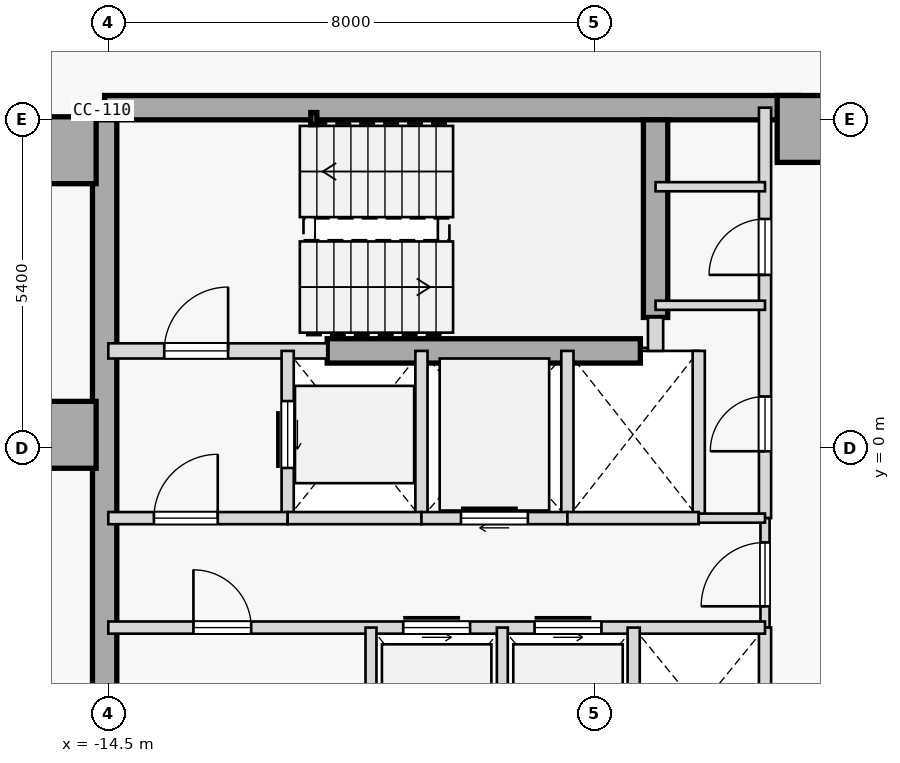
"""IFC4 building model, lengths in metres.
Left out: names, types, materials, properties, quantities, classifications, styles, units other than length and angle.
Written with IfcOpenShell. Run it as: python <this file> out.ifc"""

import sys

from ifc_helpers import new_model, si_unit, direction, frame, frame_2d, origin, origin_2d, place, context, subcontext, project, spatial, rectangle, hollow_rectangle, extrude, element, fill, save


model = new_model("IFC4")
c1 = context("Model", 3, precision=1e-05, world=origin(), true_north=direction((0.0, 1.0)))
c2 = subcontext(c1, "Body", "Model", "MODEL_VIEW")
j1 = project(units=[si_unit("LENGTHUNIT", "METRE"), si_unit("PLANEANGLEUNIT", "RADIAN")], contexts=[c1])
p1 = place(None, origin())
s1 = spatial("IfcSite", under=j1, at=p1, CompositionType="ELEMENT")
p2 = place(p1, origin())
s2 = spatial("IfcBuilding", under=s1, at=p2, CompositionType="ELEMENT")
p3 = place(p2, frame((0.0, 0.0, 175.2)))
s3 = spatial("IfcBuildingStorey", under=s2, at=p3, CompositionType="ELEMENT", Elevation=175.2)
for number, where, z_axis, x_axis in (
    (1, (-15.25, 4.9, 0.0), (0.0, 0.0, 1.0), (1.0, 0.0, 0.0)),
    (2, (-15.25, 0.22, 0.0), (0.0, 0.0, 1.0), (1.0, 0.0, 0.0)),
    (3, (-2.95, 5.25, 0.0), (0.0, 0.0, 1.0), (1.0, 0.0, 0.0)),
):
    element("IfcColumn", number, at=place(p3, frame(where, z_axis=z_axis, x_axis=x_axis)), inside=s3, PredefinedType="COLUMN", context=c2, shape_type="SweptSolid", body=[
        extrude(rectangle(XDim=1.1, YDim=1.1, at=origin_2d()), origin(), (0.0, 0.0, 1.0), 3.4),
    ])
p4 = place(p3, frame((-14.56, 5.6, 0.0), z_axis=(0.0, 0.0, 1.0), x_axis=(1.0, 0.0, 0.0)))
e4 = element("IfcWall", 4, at=p4, inside=s3, PredefinedType="SHEAR", context=c2, shape_type="SweptSolid", body=[
    extrude(rectangle(XDim=11.41, YDim=0.4, at=frame_2d((5.705, 0.0))), origin(), (0.0, 0.0, 1.0), 3.175),
])
p5 = place(p3, frame((-14.56, -5.4, 0.0), z_axis=(0.0, 0.0, 1.0), x_axis=(0.0, 1.0, 0.0)))
e5 = element("IfcWall", 5, at=p5, inside=s3, PredefinedType="SHEAR", context=c2, shape_type="SweptSolid", body=[
    extrude(rectangle(XDim=10.8, YDim=0.4, at=frame_2d((5.4, 0.0))), origin(), (0.0, 0.0, 1.0), 3.175),
])
p6 = place(p3, frame((-5.5, 2.15, 0.0), z_axis=(0.0, 0.0, 1.0), x_axis=(0.0, 1.0, 0.0)))
e6 = element("IfcWall", 6, at=p6, inside=s3, PredefinedType="SHEAR", context=c2, shape_type="SweptSolid", body=[
    extrude(rectangle(XDim=3.25, YDim=0.4, at=frame_2d((1.625, 0.0))), origin(), (0.0, 0.0, 1.0), 3.175),
])
p7 = place(p3, frame((-10.9, 1.6, 0.0), z_axis=(0.0, 0.0, 1.0), x_axis=(1.0, 0.0, 0.0)))
e7 = element("IfcWall", 7, at=p7, inside=s3, PredefinedType="SHEAR", context=c2, shape_type="SweptSolid", body=[
    extrude(rectangle(XDim=5.15, YDim=0.4, at=frame_2d((2.575, 0.0))), origin(), (0.0, 0.0, 1.0), 3.175),
])
p8 = place(p3, frame((-11.12, 5.42, 0.0), z_axis=(0.0, 0.0, 1.0), x_axis=(1.0, 0.0, 0.0)))
e8 = element("IfcColumn", 8, at=p8, inside=s3, PredefinedType="COLUMN", context=c2, shape_type="SweptSolid", body=[
    extrude(hollow_rectangle(XDim=0.1, YDim=0.2, WallThickness=0.008, at=origin_2d()), origin(), (0.0, 0.0, 1.0), 3.4),
])
p9 = place(p3, frame((-14.5, 1.6, 0.0), z_axis=(0.0, 0.0, 1.0), x_axis=(1.0, 0.0, 0.0)))
e9 = element("IfcWall", 9, at=p9, inside=s3, PredefinedType="STANDARD", context=c2, shape_type="SweptSolid", body=[
    extrude(rectangle(XDim=3.6, YDim=0.25, at=frame_2d((1.8, 0.0))), origin(), (0.0, 0.0, 1.0), 3.175),
])
p10 = place(p9, frame((0.92, 0.0, 0.0)))
e10 = element("IfcOpeningElement", 10, at=p10, cuts=e9, PredefinedType="OPENING", context=c2, shape_type="SweptSolid", body=[
    extrude(rectangle(XDim=1.05, YDim=2.15, at=frame_2d((0.525, 1.075))), frame((0.0, 0.135, 0.0), z_axis=(0.0, -1.0, 0.0), x_axis=(1.0, 0.0, 0.0)), (0.0, 0.0, 1.0), 0.27),
])
p11 = place(p3, frame((-5.5, 1.6, 0.0), z_axis=(0.0, 0.0, 1.0), x_axis=(0.0, 1.0, 0.0)))
e11 = element("IfcWall", 11, at=p11, inside=s3, PredefinedType="STANDARD", context=c2, shape_type="SweptSolid", body=[
    extrude(rectangle(XDim=0.55, YDim=0.25, at=frame_2d((0.275, 0.0))), origin(), (0.0, 0.0, 1.0), 3.175),
])
p12 = place(p3, frame((-3.7, -1.15, 0.0), z_axis=(0.0, 0.0, 1.0), x_axis=(0.0, 1.0, 0.0)))
e12 = element("IfcWall", 12, at=p12, inside=s3, PredefinedType="STANDARD", context=c2, shape_type="SweptSolid", body=[
    extrude(rectangle(XDim=6.75, YDim=0.2, at=frame_2d((3.375, 0.0))), origin(), (0.0, 0.0, 1.0), 3.175),
])
p13 = place(p12, frame((1.1, 0.0, 0.0)))
e13 = element("IfcOpeningElement", 13, at=p13, cuts=e12, PredefinedType="OPENING", context=c2, shape_type="SweptSolid", body=[
    extrude(rectangle(XDim=0.9, YDim=2.15, at=frame_2d((0.45, 1.075))), frame((0.0, 0.11, 0.0), z_axis=(0.0, -1.0, 0.0), x_axis=(1.0, 0.0, 0.0)), (0.0, 0.0, 1.0), 0.22),
])
p14 = place(p12, frame((4.0, 0.0, 0.0)))
e14 = element("IfcOpeningElement", 14, at=p14, cuts=e12, PredefinedType="OPENING", context=c2, shape_type="SweptSolid", body=[
    extrude(rectangle(XDim=0.92, YDim=2.15, at=frame_2d((0.46, 1.075))), frame((0.0, 0.11, 0.0), z_axis=(0.0, -1.0, 0.0), x_axis=(1.0, 0.0, 0.0)), (0.0, 0.0, 1.0), 0.22),
])
p15 = place(p3, frame((-3.7, -2.95, 0.0), z_axis=(0.0, 0.0, 1.0), x_axis=(0.0, 1.0, 0.0)))
e15 = element("IfcWall", 15, at=p15, inside=s3, PredefinedType="PARTITIONING", context=c2, shape_type="SweptSolid", body=[
    extrude(rectangle(XDim=1.8, YDim=0.15, at=frame_2d((0.9, 0.0))), origin(), (0.0, 0.0, 1.0), 3.175),
])
p16 = place(p15, frame((0.35, 0.0, 0.0)))
e16 = element("IfcOpeningElement", 16, at=p16, cuts=e15, PredefinedType="OPENING", context=c2, shape_type="SweptSolid", body=[
    extrude(rectangle(XDim=1.05, YDim=2.18, at=frame_2d((0.525, 1.09))), frame((0.0, 0.085, 0.0), z_axis=(0.0, -1.0, 0.0), x_axis=(1.0, 0.0, 0.0)), (0.0, 0.0, 1.0), 0.17),
])
p17 = place(p3, frame((-3.7, -5.6, 0.0), z_axis=(0.0, 0.0, 1.0), x_axis=(0.0, 1.0, 0.0)))
e17 = element("IfcWall", 17, at=p17, inside=s3, PredefinedType="STANDARD", context=c2, shape_type="SweptSolid", body=[
    extrude(rectangle(XDim=2.65, YDim=0.2, at=frame_2d((1.325, 0.0))), origin(), (0.0, 0.0, 1.0), 3.175),
])
p18 = place(p3, frame((-11.55, -1.15, 0.0), z_axis=(0.0, 0.0, 1.0), x_axis=(0.0, 1.0, 0.0)))
e18 = element("IfcWall", 18, at=p18, inside=s3, PredefinedType="STANDARD", context=c2, shape_type="SweptSolid", body=[
    extrude(rectangle(XDim=2.75, YDim=0.2, at=frame_2d((1.375, 0.0))), origin(), (0.0, 0.0, 1.0), 3.175),
])
p19 = place(p18, frame((0.825, 0.0, 0.0)))
e19 = element("IfcOpeningElement", 19, at=p19, cuts=e18, PredefinedType="OPENING", context=c2, shape_type="SweptSolid", body=[
    extrude(rectangle(XDim=1.1, YDim=2.15, at=frame_2d((0.55, 1.075))), frame((0.0, 0.11, 0.0), z_axis=(0.0, -1.0, 0.0), x_axis=(1.0, 0.0, 0.0)), (0.0, 0.0, 1.0), 0.22),
])
p20 = place(p3, frame((-9.35, -1.15, 0.0), z_axis=(0.0, 0.0, 1.0), x_axis=(0.0, 1.0, 0.0)))
e20 = element("IfcWall", 20, at=p20, inside=s3, PredefinedType="STANDARD", context=c2, shape_type="SweptSolid", body=[
    extrude(rectangle(XDim=2.75, YDim=0.2, at=frame_2d((1.375, 0.0))), origin(), (0.0, 0.0, 1.0), 3.175),
])
p21 = place(p3, frame((-14.5, -1.15, 0.0), z_axis=(0.0, 0.0, 1.0), x_axis=(1.0, 0.0, 0.0)))
e21 = element("IfcWall", 21, at=p21, inside=s3, PredefinedType="STANDARD", context=c2, shape_type="SweptSolid", body=[
    extrude(rectangle(XDim=2.95, YDim=0.2, at=frame_2d((1.475, 0.0))), origin(), (0.0, 0.0, 1.0), 3.175),
])
p22 = place(p21, frame((0.75, 0.0, 0.0)))
e22 = element("IfcOpeningElement", 22, at=p22, cuts=e21, PredefinedType="OPENING", context=c2, shape_type="SweptSolid", body=[
    extrude(rectangle(XDim=1.05, YDim=2.18, at=frame_2d((0.525, 1.09))), frame((0.0, 0.11, 0.0), z_axis=(0.0, -1.0, 0.0), x_axis=(1.0, 0.0, 0.0)), (0.0, 0.0, 1.0), 0.22),
])
p23 = place(p3, frame((-11.55, -1.15, 0.0), z_axis=(0.0, 0.0, 1.0), x_axis=(1.0, 0.0, 0.0)))
e23 = element("IfcWall", 23, at=p23, inside=s3, PredefinedType="STANDARD", context=c2, shape_type="SweptSolid", body=[
    extrude(rectangle(XDim=2.2, YDim=0.2, at=frame_2d((1.1, 0.0))), origin(), (0.0, 0.0, 1.0), 3.175),
])
p24 = place(p3, frame((-6.95, -1.15, 0.0), z_axis=(0.0, 0.0, 1.0), x_axis=(0.0, 1.0, 0.0)))
e24 = element("IfcWall", 24, at=p24, inside=s3, PredefinedType="STANDARD", context=c2, shape_type="SweptSolid", body=[
    extrude(rectangle(XDim=2.75, YDim=0.2, at=frame_2d((1.375, 0.0))), origin(), (0.0, 0.0, 1.0), 3.175),
])
p25 = place(p3, frame((-9.35, -1.15, 0.0), z_axis=(0.0, 0.0, 1.0), x_axis=(1.0, 0.0, 0.0)))
e25 = element("IfcWall", 25, at=p25, inside=s3, PredefinedType="STANDARD", context=c2, shape_type="SweptSolid", body=[
    extrude(rectangle(XDim=2.4, YDim=0.2, at=frame_2d((1.2, 0.0))), origin(), (0.0, 0.0, 1.0), 3.175),
])
p26 = place(p25, frame((0.65, 0.0, 0.0)))
e26 = element("IfcOpeningElement", 26, at=p26, cuts=e25, PredefinedType="OPENING", context=c2, shape_type="SweptSolid", body=[
    extrude(rectangle(XDim=1.1, YDim=2.15, at=frame_2d((0.55, 1.075))), frame((0.0, 0.11, 0.0), z_axis=(0.0, -1.0, 0.0), x_axis=(1.0, 0.0, 0.0)), (0.0, 0.0, 1.0), 0.22),
])
p27 = place(p3, frame((-4.79, -1.15, 0.0), z_axis=(0.0, 0.0, 1.0), x_axis=(0.0, 1.0, 0.0)))
e27 = element("IfcWall", 27, at=p27, inside=s3, PredefinedType="STANDARD", context=c2, shape_type="SweptSolid", body=[
    extrude(rectangle(XDim=2.75, YDim=0.2, at=frame_2d((1.375, 0.0))), origin(), (0.0, 0.0, 1.0), 3.175),
])
p28 = place(p3, frame((-6.95, -1.15, 0.0), z_axis=(0.0, 0.0, 1.0), x_axis=(1.0, 0.0, 0.0)))
e28 = element("IfcWall", 28, at=p28, inside=s3, PredefinedType="STANDARD", context=c2, shape_type="SweptSolid", body=[
    extrude(rectangle(XDim=2.16, YDim=0.2, at=frame_2d((1.08, 0.0))), origin(), (0.0, 0.0, 1.0), 3.175),
])
p29 = place(p3, frame((-4.79, -1.15, 0.0), z_axis=(0.0, 0.0, 1.0), x_axis=(1.0, 0.0, 0.0)))
e29 = element("IfcWall", 29, at=p29, inside=s3, PredefinedType="PARTITIONING", context=c2, shape_type="SweptSolid", body=[
    extrude(rectangle(XDim=1.09, YDim=0.15, at=frame_2d((0.545, 0.0))), origin(), (0.0, 0.0, 1.0), 3.175),
])
p30 = place(p3, frame((-14.5, -2.95, 0.0), z_axis=(0.0, 0.0, 1.0), x_axis=(1.0, 0.0, 0.0)))
e30 = element("IfcWall", 30, at=p30, inside=s3, PredefinedType="STANDARD", context=c2, shape_type="SweptSolid", body=[
    extrude(rectangle(XDim=10.8, YDim=0.2, at=frame_2d((5.4, 0.0))), origin(), (0.0, 0.0, 1.0), 3.175),
])
p31 = place(p30, frame((4.85, 0.0, 0.0)))
e31 = element("IfcOpeningElement", 31, at=p31, cuts=e30, PredefinedType="OPENING", context=c2, shape_type="SweptSolid", body=[
    extrude(rectangle(XDim=1.1, YDim=2.15, at=frame_2d((0.55, 1.075))), frame((0.0, 0.11, 0.0), z_axis=(0.0, -1.0, 0.0), x_axis=(1.0, 0.0, 0.0)), (0.0, 0.0, 1.0), 0.22),
])
p32 = place(p30, frame((7.01, 0.0, 0.0)))
e32 = element("IfcOpeningElement", 32, at=p32, cuts=e30, PredefinedType="OPENING", context=c2, shape_type="SweptSolid", body=[
    extrude(rectangle(XDim=1.1, YDim=2.15, at=frame_2d((0.55, 1.075))), frame((0.0, 0.11, 0.0), z_axis=(0.0, -1.0, 0.0), x_axis=(1.0, 0.0, 0.0)), (0.0, 0.0, 1.0), 0.22),
])
p33 = place(p30, frame((1.4, 0.0, 0.0)))
e33 = element("IfcOpeningElement", 33, at=p33, cuts=e30, PredefinedType="OPENING", context=c2, shape_type="SweptSolid", body=[
    extrude(rectangle(XDim=0.95, YDim=2.15, at=frame_2d((0.475, 1.075))), frame((0.0, 0.11, 0.0), z_axis=(0.0, -1.0, 0.0), x_axis=(1.0, 0.0, 0.0)), (0.0, 0.0, 1.0), 0.22),
])
p34 = place(p3, frame((-5.86, -5.6, 0.0), z_axis=(0.0, 0.0, 1.0), x_axis=(0.0, 1.0, 0.0)))
e34 = element("IfcWall", 34, at=p34, inside=s3, PredefinedType="STANDARD", context=c2, shape_type="SweptSolid", body=[
    extrude(rectangle(XDim=2.65, YDim=0.2, at=frame_2d((1.325, 0.0))), origin(), (0.0, 0.0, 1.0), 3.175),
])
for number, where, z_axis, x_axis in (
    (35, (-10.18, -5.6, 0.0), (0.0, 0.0, 1.0), (0.0, 1.0, 0.0)),
    (36, (-8.02, -5.6, 0.0), (0.0, 0.0, 1.0), (0.0, 1.0, 0.0)),
):
    element("IfcWall", number, at=place(p3, frame(where, z_axis=z_axis, x_axis=x_axis)), inside=s3, PredefinedType="STANDARD", context=c2, shape_type="SweptSolid", body=[
        extrude(rectangle(XDim=2.65, YDim=0.18, at=frame_2d((1.325, 0.0))), origin(), (0.0, 0.0, 1.0), 3.175),
    ])
for number, where, z_axis, x_axis in (
    (37, (-5.5, 4.3, 0.0), (0.0, 0.0, 1.0), (1.0, 0.0, 0.0)),
    (38, (-5.5, 2.35, 0.0), (0.0, 0.0, 1.0), (1.0, 0.0, 0.0)),
):
    element("IfcWall", number, at=place(p3, frame(where, z_axis=z_axis, x_axis=x_axis)), inside=s3, PredefinedType="PARTITIONING", context=c2, shape_type="SweptSolid", body=[
        extrude(rectangle(XDim=1.8, YDim=0.15, at=frame_2d((0.9, 0.0))), origin(), (0.0, 0.0, 1.0), 3.175),
    ])
p35 = place(p10, origin())
e39 = element("IfcDoor", 39, at=p35, inside=s3, OperationType="SINGLE_SWING_RIGHT", PredefinedType="DOOR", context=c2, shape_type="SweptSolid", body=[
    extrude(rectangle(XDim=1.05, YDim=2.15, at=frame_2d((0.525, 1.075))), frame((0.0, 0.025, 0.0), z_axis=(0.0, -1.0, 0.0), x_axis=(1.0, 0.0, 0.0)), (0.0, 0.0, 1.0), 0.05),
])
fill(e10, e39)
p36 = place(p22, origin())
e40 = element("IfcDoor", 40, at=p36, inside=s3, OperationType="SINGLE_SWING_RIGHT", PredefinedType="DOOR", context=c2, shape_type="SweptSolid", body=[
    extrude(rectangle(XDim=1.05, YDim=2.18, at=frame_2d((0.525, 1.09))), frame((0.0, 0.025, 0.0), z_axis=(0.0, -1.0, 0.0), x_axis=(1.0, 0.0, 0.0)), (0.0, 0.0, 1.0), 0.05),
])
fill(e22, e40)
p37 = place(p16, origin())
e41 = element("IfcDoor", 41, at=p37, inside=s3, OperationType="SINGLE_SWING_LEFT", PredefinedType="DOOR", context=c2, shape_type="SweptSolid", body=[
    extrude(rectangle(XDim=1.05, YDim=2.18, at=frame_2d((0.525, 1.09))), frame((0.0, 0.025, 0.0), z_axis=(0.0, -1.0, 0.0), x_axis=(1.0, 0.0, 0.0)), (0.0, 0.0, 1.0), 0.05),
])
fill(e16, e41)
p38 = place(p19, origin())
e42 = element("IfcDoor", 42, at=p38, inside=s3, OperationType="SLIDING_TO_RIGHT", PredefinedType="DOOR", context=c2, shape_type="SweptSolid", body=[
    extrude(rectangle(XDim=1.1, YDim=2.15, at=frame_2d((0.55, 1.075))), frame((0.0, 0.025, 0.0), z_axis=(0.0, -1.0, 0.0), x_axis=(1.0, 0.0, 0.0)), (0.0, 0.0, 1.0), 0.05),
])
fill(e19, e42)
p39 = place(p26, origin())
e43 = element("IfcDoor", 43, at=p39, inside=s3, OperationType="SLIDING_TO_RIGHT", PredefinedType="DOOR", context=c2, shape_type="SweptSolid", body=[
    extrude(rectangle(XDim=1.1, YDim=2.15, at=frame_2d((0.55, 1.075))), frame((0.0, 0.025, 0.0), z_axis=(0.0, -1.0, 0.0), x_axis=(1.0, 0.0, 0.0)), (0.0, 0.0, 1.0), 0.05),
])
fill(e26, e43)
p40 = place(p31, origin())
e44 = element("IfcDoor", 44, at=p40, inside=s3, OperationType="SLIDING_TO_LEFT", PredefinedType="DOOR", context=c2, shape_type="SweptSolid", body=[
    extrude(rectangle(XDim=1.1, YDim=2.15, at=frame_2d((0.55, 1.075))), frame((0.0, 0.025, 0.0), z_axis=(0.0, -1.0, 0.0), x_axis=(1.0, 0.0, 0.0)), (0.0, 0.0, 1.0), 0.05),
])
fill(e31, e44)
p41 = place(p32, origin())
e45 = element("IfcDoor", 45, at=p41, inside=s3, OperationType="SLIDING_TO_LEFT", PredefinedType="DOOR", context=c2, shape_type="SweptSolid", body=[
    extrude(rectangle(XDim=1.1, YDim=2.15, at=frame_2d((0.55, 1.075))), frame((0.0, 0.025, 0.0), z_axis=(0.0, -1.0, 0.0), x_axis=(1.0, 0.0, 0.0)), (0.0, 0.0, 1.0), 0.05),
])
fill(e32, e45)
p42 = place(p33, origin())
e46 = element("IfcDoor", 46, at=p42, inside=s3, OperationType="SINGLE_SWING_LEFT", PredefinedType="DOOR", context=c2, shape_type="SweptSolid", body=[
    extrude(rectangle(XDim=0.95, YDim=2.15, at=frame_2d((0.475, 1.075))), frame((0.0, 0.025, 0.0), z_axis=(0.0, -1.0, 0.0), x_axis=(1.0, 0.0, 0.0)), (0.0, 0.0, 1.0), 0.05),
])
fill(e33, e46)
p43 = place(p13, origin())
e47 = element("IfcDoor", 47, at=p43, inside=s3, OperationType="SINGLE_SWING_LEFT", PredefinedType="DOOR", context=c2, shape_type="SweptSolid", body=[
    extrude(rectangle(XDim=0.9, YDim=2.15, at=frame_2d((0.45, 1.075))), frame((0.0, 0.025, 0.0), z_axis=(0.0, -1.0, 0.0), x_axis=(1.0, 0.0, 0.0)), (0.0, 0.0, 1.0), 0.05),
])
fill(e13, e47)
p44 = place(p14, origin())
e48 = element("IfcDoor", 48, at=p44, inside=s3, OperationType="SINGLE_SWING_LEFT", PredefinedType="DOOR", context=c2, shape_type="SweptSolid", body=[
    extrude(rectangle(XDim=0.92, YDim=2.15, at=frame_2d((0.46, 1.075))), frame((0.0, 0.025, 0.0), z_axis=(0.0, -1.0, 0.0), x_axis=(1.0, 0.0, 0.0)), (0.0, 0.0, 1.0), 0.05),
])
fill(e14, e48)
save(model, sys.argv[1])
